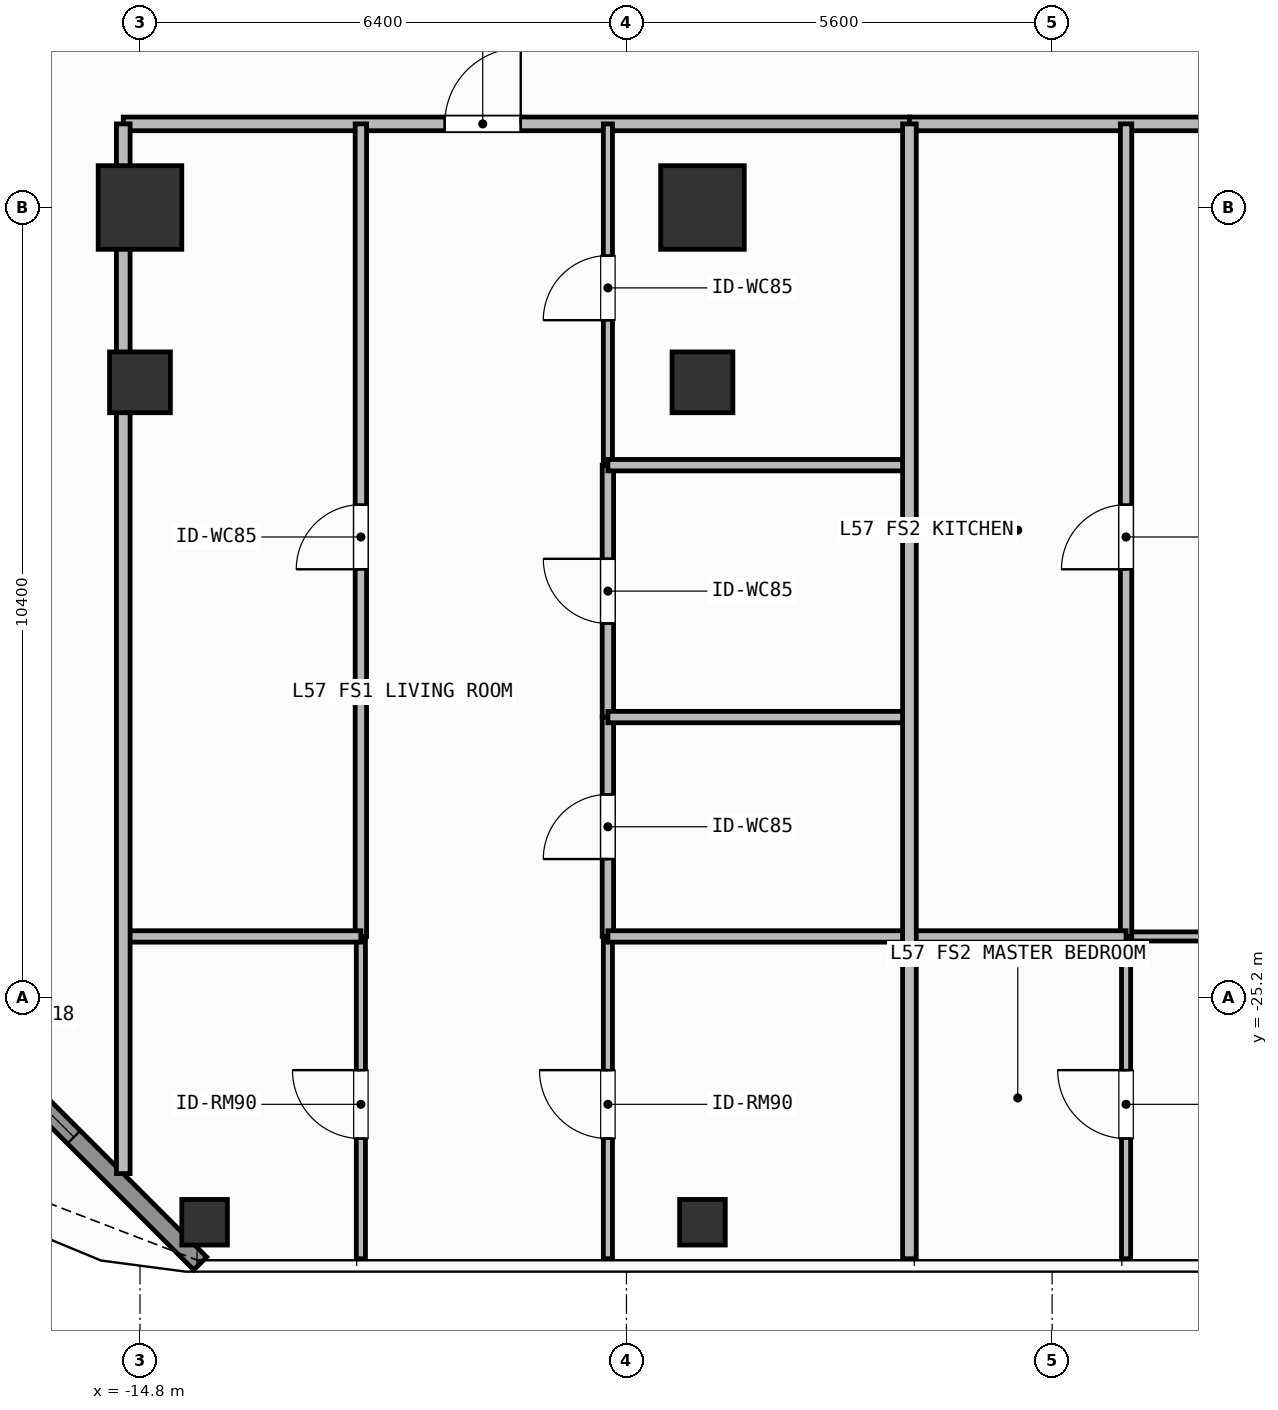
"""IFC4 building model, lengths in metres.
Left out: names, types, materials, properties, quantities, classifications, styles, units other than length and angle.
Written with IfcOpenShell. Run it as: python <this file> out.ifc"""

import sys

from ifc_helpers import new_model, si_unit, direction, frame, frame_2d, origin, origin_2d, place, context, subcontext, project, spatial, rectangle, hollow_rectangle, extrude, element, fill, save


model = new_model("IFC4")
c1 = context("Model", 3, precision=1e-05, world=origin(), true_north=direction((0.0, 1.0)))
c2 = subcontext(c1, "Body", "Model", "MODEL_VIEW")
j1 = project(units=[si_unit("LENGTHUNIT", "METRE"), si_unit("PLANEANGLEUNIT", "RADIAN")], contexts=[c1])
p1 = place(None, origin())
s1 = spatial("IfcSite", under=j1, at=p1, CompositionType="ELEMENT")
p2 = place(p1, origin())
s2 = spatial("IfcBuilding", under=s1, at=p2, CompositionType="ELEMENT")
p3 = place(p2, frame((0.0, 0.0, 231.3)))
s3 = spatial("IfcBuildingStorey", under=s2, at=p3, CompositionType="ELEMENT", Elevation=231.3)
for number, where, z_axis, x_axis in (
    (1, (-14.8, -14.8, 0.0), (0.0, 0.0, 1.0), (1.0, 0.0, 0.0)),
    (2, (-7.4, -14.8, 0.0), (0.0, 0.0, 1.0), (1.0, 0.0, 0.0)),
):
    element("IfcColumn", number, at=place(p3, frame(where, z_axis=z_axis, x_axis=x_axis)), inside=s3, PredefinedType="COLUMN", context=c2, shape_type="SweptSolid", body=[
        extrude(rectangle(XDim=1.1, YDim=1.1, at=origin_2d()), origin(), (0.0, 0.0, 1.0), 3.9),
    ])
for number, where, z_axis, x_axis in (
    (3, (-14.8, -17.1, 0.0), (0.0, 0.0, 1.0), (1.0, 0.0, 0.0)),
    (4, (-7.4, -17.1, 0.0), (0.0, 0.0, 1.0), (1.0, 0.0, 0.0)),
):
    element("IfcColumn", number, at=place(p3, frame(where, z_axis=z_axis, x_axis=x_axis)), inside=s3, PredefinedType="COLUMN", context=c2, shape_type="SweptSolid", body=[
        extrude(hollow_rectangle(XDim=0.8, YDim=0.8, WallThickness=0.036, at=origin_2d()), origin(), (0.0, 0.0, 1.0), 3.9),
    ])
for number, where, z_axis, x_axis in (
    (5, (-13.95, -28.15, 0.0), (0.0, 0.0, 1.0), (1.0, 0.0, 0.0)),
    (6, (-7.4, -28.15, 0.0), (0.0, 0.0, 1.0), (1.0, 0.0, 0.0)),
):
    element("IfcColumn", number, at=place(p3, frame(where, z_axis=z_axis, x_axis=x_axis)), inside=s3, PredefinedType="COLUMN", context=c2, shape_type="SweptSolid", body=[
        extrude(hollow_rectangle(XDim=0.6, YDim=0.6, WallThickness=0.028, at=origin_2d()), origin(), (0.0, 0.0, 1.0), 3.9),
    ])
p4 = place(p3, frame((-14.008, -28.692, 0.0), z_axis=(0.0, 0.0, 1.0), x_axis=(-0.707106781187, 0.707106781187, 0.0)))
e7 = element("IfcWall", 7, at=p4, inside=s3, PredefinedType="SOLIDWALL", context=c2, shape_type="SweptSolid", body=[
    extrude(rectangle(XDim=6.201, YDim=0.24, at=frame_2d((3.101, 0.0))), origin(), (0.0, 0.0, 1.0), 3.6),
])
p5 = place(p4, frame((2.351, 0.0, 0.8)))
e8 = element("IfcOpeningElement", 8, at=p5, cuts=e7, PredefinedType="OPENING", context=c2, shape_type="SweptSolid", body=[
    extrude(rectangle(XDim=1.5, YDim=1.85, at=frame_2d((0.75, 0.925))), frame((0.0, 0.13, 0.0), z_axis=(0.0, -1.0, 0.0), x_axis=(1.0, 0.0, 0.0)), (0.0, 0.0, 1.0), 0.26),
])
p6 = place(p3, frame((-15.02, -13.7, 0.0), z_axis=(0.0, 0.0, 1.0), x_axis=(1.0, 0.0, 0.0)))
e9 = element("IfcWall", 9, at=p6, inside=s3, PredefinedType="PARTITIONING", context=c2, shape_type="SweptSolid", body=[
    extrude(rectangle(XDim=10.343, YDim=0.18, at=frame_2d((5.171, 0.0))), origin(), (0.0, 0.0, 1.0), 3.6),
])
p7 = place(p6, frame((4.229, 0.0, 0.0)))
e10 = element("IfcOpeningElement", 10, at=p7, cuts=e9, PredefinedType="OPENING", context=c2, shape_type="SweptSolid", body=[
    extrude(rectangle(XDim=1.0, YDim=2.2, at=frame_2d((0.5, 1.1))), frame((0.0, 0.1, 0.0), z_axis=(0.0, -1.0, 0.0), x_axis=(1.0, 0.0, 0.0)), (0.0, 0.0, 1.0), 0.2),
])
p8 = place(p3, frame((-11.894, -24.39, 0.0), z_axis=(0.0, 0.0, 1.0), x_axis=(0.0, 1.0, 0.0)))
e11 = element("IfcWall", 11, at=p8, inside=s3, PredefinedType="PARTITIONING", context=c2, shape_type="SweptSolid", body=[
    extrude(rectangle(XDim=10.69, YDim=0.15, at=frame_2d((5.345, 0.0))), origin(), (0.0, 0.0, 1.0), 3.6),
])
p9 = place(p8, frame((4.83, 0.0, 0.0)))
e12 = element("IfcOpeningElement", 12, at=p9, cuts=e11, PredefinedType="OPENING", context=c2, shape_type="SweptSolid", body=[
    extrude(rectangle(XDim=0.85, YDim=2.1, at=frame_2d((0.425, 1.05))), frame((0.0, 0.085, 0.0), z_axis=(0.0, -1.0, 0.0), x_axis=(1.0, 0.0, 0.0)), (0.0, 0.0, 1.0), 0.17),
])
p10 = place(p3, frame((-11.894, -28.63, 0.0), z_axis=(0.0, 0.0, 1.0), x_axis=(0.0, 1.0, 0.0)))
e13 = element("IfcWall", 13, at=p10, inside=s3, PredefinedType="PARTITIONING", context=c2, shape_type="SweptSolid", body=[
    extrude(rectangle(XDim=4.24, YDim=0.12, at=frame_2d((2.12, 0.0))), origin(), (0.0, 0.0, 1.0), 3.6),
])
p11 = place(p10, frame((1.581, 0.0, 0.0)))
e14 = element("IfcOpeningElement", 14, at=p11, cuts=e13, PredefinedType="OPENING", context=c2, shape_type="SweptSolid", body=[
    extrude(rectangle(XDim=0.9, YDim=2.1, at=frame_2d((0.45, 1.05))), frame((0.0, 0.07, 0.0), z_axis=(0.0, -1.0, 0.0), x_axis=(1.0, 0.0, 0.0)), (0.0, 0.0, 1.0), 0.14),
])
p12 = place(p3, frame((-8.644, -24.39, 0.0), z_axis=(0.0, 0.0, 1.0), x_axis=(0.0, 1.0, 0.0)))
e15 = element("IfcWall", 15, at=p12, inside=s3, PredefinedType="PARTITIONING", context=c2, shape_type="SweptSolid", body=[
    extrude(rectangle(XDim=2.886, YDim=0.15, at=frame_2d((1.443, 0.0))), origin(), (0.0, 0.0, 1.0), 3.6),
])
p13 = place(p12, frame((1.018, 0.0, 0.0)))
e16 = element("IfcOpeningElement", 16, at=p13, cuts=e15, PredefinedType="OPENING", context=c2, shape_type="SweptSolid", body=[
    extrude(rectangle(XDim=0.85, YDim=2.1, at=frame_2d((0.425, 1.05))), frame((0.0, 0.085, 0.0), z_axis=(0.0, -1.0, 0.0), x_axis=(1.0, 0.0, 0.0)), (0.0, 0.0, 1.0), 0.17),
])
p14 = place(p3, frame((-8.644, -21.504, 0.0), z_axis=(0.0, 0.0, 1.0), x_axis=(0.0, 1.0, 0.0)))
e17 = element("IfcWall", 17, at=p14, inside=s3, PredefinedType="PARTITIONING", context=c2, shape_type="SweptSolid", body=[
    extrude(rectangle(XDim=3.314, YDim=0.15, at=frame_2d((1.657, 0.0))), origin(), (0.0, 0.0, 1.0), 3.6),
])
p15 = place(p14, frame((1.232, 0.0, 0.0)))
e18 = element("IfcOpeningElement", 18, at=p15, cuts=e17, PredefinedType="OPENING", context=c2, shape_type="SweptSolid", body=[
    extrude(rectangle(XDim=0.85, YDim=2.1, at=frame_2d((0.425, 1.05))), frame((0.0, 0.085, 0.0), z_axis=(0.0, -1.0, 0.0), x_axis=(1.0, 0.0, 0.0)), (0.0, 0.0, 1.0), 0.17),
])
p16 = place(p3, frame((-8.644, -18.19, 0.0), z_axis=(0.0, 0.0, 1.0), x_axis=(0.0, 1.0, 0.0)))
e19 = element("IfcWall", 19, at=p16, inside=s3, PredefinedType="PARTITIONING", context=c2, shape_type="SweptSolid", body=[
    extrude(rectangle(XDim=4.49, YDim=0.12, at=frame_2d((2.245, 0.0))), origin(), (0.0, 0.0, 1.0), 3.6),
])
p17 = place(p16, frame((1.907, 0.0, 0.0)))
e20 = element("IfcOpeningElement", 20, at=p17, cuts=e19, PredefinedType="OPENING", context=c2, shape_type="SweptSolid", body=[
    extrude(rectangle(XDim=0.85, YDim=2.1, at=frame_2d((0.425, 1.05))), frame((0.0, 0.07, 0.0), z_axis=(0.0, -1.0, 0.0), x_axis=(1.0, 0.0, 0.0)), (0.0, 0.0, 1.0), 0.14),
])
p18 = place(p3, frame((-8.644, -28.63, 0.0), z_axis=(0.0, 0.0, 1.0), x_axis=(0.0, 1.0, 0.0)))
e21 = element("IfcWall", 21, at=p18, inside=s3, PredefinedType="PARTITIONING", context=c2, shape_type="SweptSolid", body=[
    extrude(rectangle(XDim=4.24, YDim=0.12, at=frame_2d((2.12, 0.0))), origin(), (0.0, 0.0, 1.0), 3.6),
])
p19 = place(p18, frame((1.581, 0.0, 0.0)))
e22 = element("IfcOpeningElement", 22, at=p19, cuts=e21, PredefinedType="OPENING", context=c2, shape_type="SweptSolid", body=[
    extrude(rectangle(XDim=0.9, YDim=2.1, at=frame_2d((0.45, 1.05))), frame((0.0, 0.07, 0.0), z_axis=(0.0, -1.0, 0.0), x_axis=(1.0, 0.0, 0.0)), (0.0, 0.0, 1.0), 0.14),
])
p20 = place(p3, frame((-4.677, -13.7, 0.0), z_axis=(0.0, 0.0, 1.0), x_axis=(1.0, 0.0, 0.0)))
e23 = element("IfcWall", 23, at=p20, inside=s3, PredefinedType="PARTITIONING", context=c2, shape_type="SweptSolid", body=[
    extrude(rectangle(XDim=15.905, YDim=0.18, at=frame_2d((7.953, 0.0))), origin(), (0.0, 0.0, 1.0), 3.6),
])
p21 = place(p20, frame((6.03, 0.0, 0.0)))
e24 = element("IfcOpeningElement", 24, at=p21, cuts=e23, PredefinedType="OPENING", context=c2, shape_type="SweptSolid", body=[
    extrude(rectangle(XDim=1.0, YDim=2.2, at=frame_2d((0.5, 1.1))), frame((0.0, 0.1, 0.0), z_axis=(0.0, -1.0, 0.0), x_axis=(1.0, 0.0, 0.0)), (0.0, 0.0, 1.0), 0.2),
])
p22 = place(p3, frame((-1.827, -24.39, 0.0), z_axis=(0.0, 0.0, 1.0), x_axis=(1.0, 0.0, 0.0)))
e25 = element("IfcWall", 25, at=p22, inside=s3, PredefinedType="PARTITIONING", context=c2, shape_type="SweptSolid", body=[
    extrude(rectangle(XDim=7.252, YDim=0.12, at=frame_2d((3.626, 0.0))), origin(), (0.0, 0.0, 1.0), 3.6),
])
p23 = place(p22, frame((3.176, 0.0, 0.0)))
e26 = element("IfcOpeningElement", 26, at=p23, cuts=e25, PredefinedType="OPENING", context=c2, shape_type="SweptSolid", body=[
    extrude(rectangle(XDim=0.9, YDim=2.1, at=frame_2d((0.45, 1.05))), frame((0.0, 0.07, 0.0), z_axis=(0.0, -1.0, 0.0), x_axis=(1.0, 0.0, 0.0)), (0.0, 0.0, 1.0), 0.14),
])
p24 = place(p3, frame((-1.827, -24.39, 0.0), z_axis=(0.0, 0.0, 1.0), x_axis=(0.0, 1.0, 0.0)))
e27 = element("IfcWall", 27, at=p24, inside=s3, PredefinedType="PARTITIONING", context=c2, shape_type="SweptSolid", body=[
    extrude(rectangle(XDim=10.69, YDim=0.15, at=frame_2d((5.345, 0.0))), origin(), (0.0, 0.0, 1.0), 3.6),
])
p25 = place(p24, frame((4.83, 0.0, 0.0)))
e28 = element("IfcOpeningElement", 28, at=p25, cuts=e27, PredefinedType="OPENING", context=c2, shape_type="SweptSolid", body=[
    extrude(rectangle(XDim=0.85, YDim=2.1, at=frame_2d((0.425, 1.05))), frame((0.0, 0.085, 0.0), z_axis=(0.0, -1.0, 0.0), x_axis=(1.0, 0.0, 0.0)), (0.0, 0.0, 1.0), 0.17),
])
p26 = place(p3, frame((-1.827, -28.63, 0.0), z_axis=(0.0, 0.0, 1.0), x_axis=(0.0, 1.0, 0.0)))
e29 = element("IfcWall", 29, at=p26, inside=s3, PredefinedType="PARTITIONING", context=c2, shape_type="SweptSolid", body=[
    extrude(rectangle(XDim=4.24, YDim=0.12, at=frame_2d((2.12, 0.0))), origin(), (0.0, 0.0, 1.0), 3.6),
])
p27 = place(p26, frame((1.581, 0.0, 0.0)))
e30 = element("IfcOpeningElement", 30, at=p27, cuts=e29, PredefinedType="OPENING", context=c2, shape_type="SweptSolid", body=[
    extrude(rectangle(XDim=0.9, YDim=2.1, at=frame_2d((0.45, 1.05))), frame((0.0, 0.07, 0.0), z_axis=(0.0, -1.0, 0.0), x_axis=(1.0, 0.0, 0.0)), (0.0, 0.0, 1.0), 0.14),
])
p28 = place(p3, frame((-15.02, -24.39, 0.0), z_axis=(0.0, 0.0, 1.0), x_axis=(1.0, 0.0, 0.0)))
e31 = element("IfcWall", 31, at=p28, inside=s3, PredefinedType="PARTITIONING", context=c2, shape_type="SweptSolid", body=[
    extrude(rectangle(XDim=3.126, YDim=0.15, at=frame_2d((1.563, 0.0))), origin(), (0.0, 0.0, 1.0), 3.6),
])
for number, where, z_axis, x_axis in (
    (32, (-8.644, -21.504, 0.0), (0.0, 0.0, 1.0), (1.0, 0.0, 0.0)),
    (33, (-8.644, -18.19, 0.0), (0.0, 0.0, 1.0), (1.0, 0.0, 0.0)),
    (34, (-8.644, -24.39, 0.0), (0.0, 0.0, 1.0), (1.0, 0.0, 0.0)),
):
    element("IfcWall", number, at=place(p3, frame(where, z_axis=z_axis, x_axis=x_axis)), inside=s3, PredefinedType="PARTITIONING", context=c2, shape_type="SweptSolid", body=[
        extrude(rectangle(XDim=3.967, YDim=0.15, at=frame_2d((1.983, 0.0))), origin(), (0.0, 0.0, 1.0), 3.6),
    ])
p29 = place(p3, frame((-4.677, -24.39, 0.0), z_axis=(0.0, 0.0, 1.0), x_axis=(1.0, 0.0, 0.0)))
e35 = element("IfcWall", 35, at=p29, inside=s3, PredefinedType="PARTITIONING", context=c2, shape_type="SweptSolid", body=[
    extrude(rectangle(XDim=2.85, YDim=0.15, at=frame_2d((1.425, 0.0))), origin(), (0.0, 0.0, 1.0), 3.6),
])
p30 = place(p3, frame((-4.677, -28.63, 0.0), z_axis=(0.0, 0.0, 1.0), x_axis=(0.0, 1.0, 0.0)))
e36 = element("IfcWall", 36, at=p30, inside=s3, PredefinedType="PARTITIONING", context=c2, shape_type="SweptSolid", body=[
    extrude(rectangle(XDim=14.93, YDim=0.18, at=frame_2d((7.465, 0.0))), origin(), (0.0, 0.0, 1.0), 3.6),
])
p31 = place(p3, frame((-15.02, -27.51, 0.0), z_axis=(0.0, 0.0, 1.0), x_axis=(0.0, 1.0, 0.0)))
e37 = element("IfcWall", 37, at=p31, inside=s3, PredefinedType="PARTITIONING", context=c2, shape_type="SweptSolid", body=[
    extrude(rectangle(XDim=13.81, YDim=0.18, at=frame_2d((6.905, 0.0))), origin(), (0.0, 0.0, 1.0), 3.6),
])
p32 = place(p5, origin())
e38 = element("IfcWindow", 38, at=p32, inside=s3, PartitioningType="SINGLE_PANEL", PredefinedType="WINDOW", context=c2, shape_type="SweptSolid", body=[
    extrude(rectangle(XDim=1.5, YDim=1.85, at=frame_2d((0.75, 0.925))), frame((0.0, 0.03, 0.0), z_axis=(0.0, -1.0, 0.0), x_axis=(1.0, 0.0, 0.0)), (0.0, 0.0, 1.0), 0.06),
])
fill(e8, e38)
p33 = place(p7, origin())
e39 = element("IfcDoor", 39, at=p33, inside=s3, OperationType="SINGLE_SWING_RIGHT", PredefinedType="DOOR", context=c2, shape_type="SweptSolid", body=[
    extrude(rectangle(XDim=1.0, YDim=2.2, at=frame_2d((0.5, 1.1))), frame((0.0, 0.025, 0.0), z_axis=(0.0, -1.0, 0.0), x_axis=(1.0, 0.0, 0.0)), (0.0, 0.0, 1.0), 0.05),
])
fill(e10, e39)
p34 = place(p9, origin())
e40 = element("IfcDoor", 40, at=p34, inside=s3, OperationType="SINGLE_SWING_LEFT", PredefinedType="DOOR", context=c2, shape_type="SweptSolid", body=[
    extrude(rectangle(XDim=0.85, YDim=2.1, at=frame_2d((0.425, 1.05))), frame((0.0, 0.025, 0.0), z_axis=(0.0, -1.0, 0.0), x_axis=(1.0, 0.0, 0.0)), (0.0, 0.0, 1.0), 0.05),
])
fill(e12, e40)
p35 = place(p11, origin())
e41 = element("IfcDoor", 41, at=p35, inside=s3, OperationType="SINGLE_SWING_RIGHT", PredefinedType="DOOR", context=c2, shape_type="SweptSolid", body=[
    extrude(rectangle(XDim=0.9, YDim=2.1, at=frame_2d((0.45, 1.05))), frame((0.0, 0.025, 0.0), z_axis=(0.0, -1.0, 0.0), x_axis=(1.0, 0.0, 0.0)), (0.0, 0.0, 1.0), 0.05),
])
fill(e14, e41)
p36 = place(p13, origin())
e42 = element("IfcDoor", 42, at=p36, inside=s3, OperationType="SINGLE_SWING_LEFT", PredefinedType="DOOR", context=c2, shape_type="SweptSolid", body=[
    extrude(rectangle(XDim=0.85, YDim=2.1, at=frame_2d((0.425, 1.05))), frame((0.0, 0.025, 0.0), z_axis=(0.0, -1.0, 0.0), x_axis=(1.0, 0.0, 0.0)), (0.0, 0.0, 1.0), 0.05),
])
fill(e16, e42)
p37 = place(p15, origin())
e43 = element("IfcDoor", 43, at=p37, inside=s3, OperationType="SINGLE_SWING_RIGHT", PredefinedType="DOOR", context=c2, shape_type="SweptSolid", body=[
    extrude(rectangle(XDim=0.85, YDim=2.1, at=frame_2d((0.425, 1.05))), frame((0.0, 0.025, 0.0), z_axis=(0.0, -1.0, 0.0), x_axis=(1.0, 0.0, 0.0)), (0.0, 0.0, 1.0), 0.05),
])
fill(e18, e43)
p38 = place(p17, origin())
e44 = element("IfcDoor", 44, at=p38, inside=s3, OperationType="SINGLE_SWING_LEFT", PredefinedType="DOOR", context=c2, shape_type="SweptSolid", body=[
    extrude(rectangle(XDim=0.85, YDim=2.1, at=frame_2d((0.425, 1.05))), frame((0.0, 0.025, 0.0), z_axis=(0.0, -1.0, 0.0), x_axis=(1.0, 0.0, 0.0)), (0.0, 0.0, 1.0), 0.05),
])
fill(e20, e44)
p39 = place(p19, origin())
e45 = element("IfcDoor", 45, at=p39, inside=s3, OperationType="SINGLE_SWING_RIGHT", PredefinedType="DOOR", context=c2, shape_type="SweptSolid", body=[
    extrude(rectangle(XDim=0.9, YDim=2.1, at=frame_2d((0.45, 1.05))), frame((0.0, 0.025, 0.0), z_axis=(0.0, -1.0, 0.0), x_axis=(1.0, 0.0, 0.0)), (0.0, 0.0, 1.0), 0.05),
])
fill(e22, e45)
p40 = place(p25, origin())
e46 = element("IfcDoor", 46, at=p40, inside=s3, OperationType="SINGLE_SWING_LEFT", PredefinedType="DOOR", context=c2, shape_type="SweptSolid", body=[
    extrude(rectangle(XDim=0.85, YDim=2.1, at=frame_2d((0.425, 1.05))), frame((0.0, 0.025, 0.0), z_axis=(0.0, -1.0, 0.0), x_axis=(1.0, 0.0, 0.0)), (0.0, 0.0, 1.0), 0.05),
])
fill(e28, e46)
p41 = place(p27, origin())
e47 = element("IfcDoor", 47, at=p41, inside=s3, OperationType="SINGLE_SWING_RIGHT", PredefinedType="DOOR", context=c2, shape_type="SweptSolid", body=[
    extrude(rectangle(XDim=0.9, YDim=2.1, at=frame_2d((0.45, 1.05))), frame((0.0, 0.025, 0.0), z_axis=(0.0, -1.0, 0.0), x_axis=(1.0, 0.0, 0.0)), (0.0, 0.0, 1.0), 0.05),
])
fill(e30, e47)
save(model, sys.argv[1])
